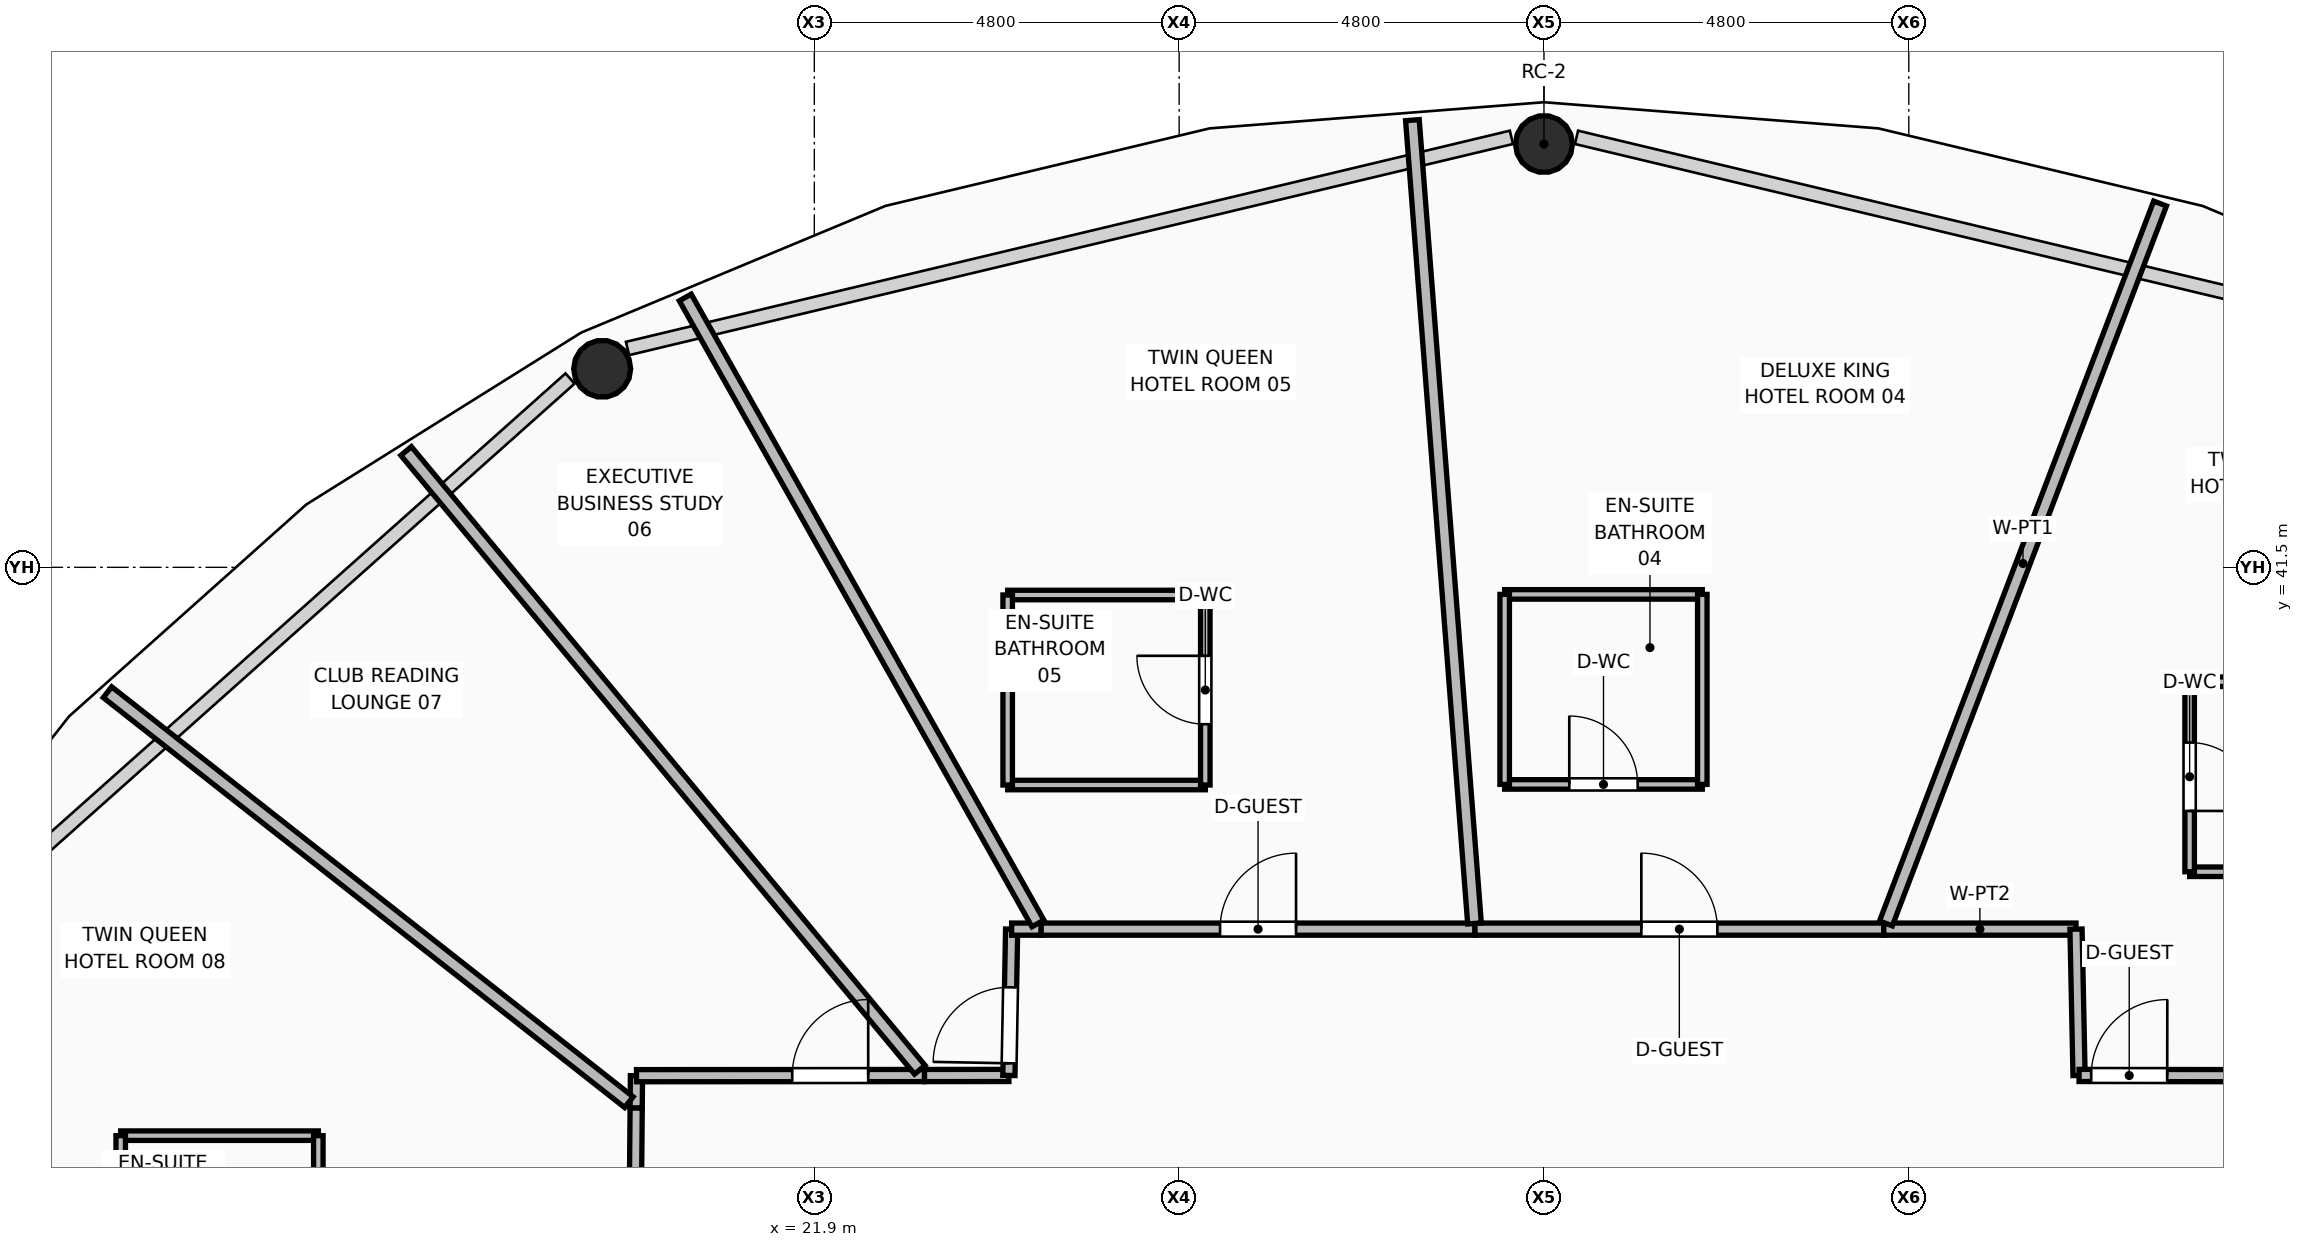
"""IFC4 building model, lengths in metres.
Left out: names, types, materials, properties, quantities, classifications, styles, units other than length and angle.
Written with IfcOpenShell. Run it as: python <this file> out.ifc"""

import sys

from ifc_helpers import new_model, si_unit, direction, frame, frame_2d, origin, origin_2d, place, context, subcontext, project, spatial, rectangle, hollow_circle, extrude, element, fill, save


model = new_model("IFC4")
c1 = context("Model", 3, precision=1e-05, world=origin(), true_north=direction((0.0, 1.0)))
c2 = subcontext(c1, "Body", "Model", "MODEL_VIEW")
j1 = project(units=[si_unit("LENGTHUNIT", "METRE"), si_unit("PLANEANGLEUNIT", "RADIAN")], contexts=[c1])
p1 = place(None, origin())
s1 = spatial("IfcSite", under=j1, at=p1, CompositionType="ELEMENT")
p2 = place(p1, origin())
s2 = spatial("IfcBuilding", under=s1, at=p2, CompositionType="ELEMENT")
p3 = place(p2, frame((0.0, 0.0, 153.45)))
s3 = spatial("IfcBuildingStorey", under=s2, at=p3, CompositionType="ELEMENT", Elevation=153.45)
for number, where, z_axis, x_axis in (
    (1, (31.5, 47.069, 0.0), (0.0, 0.0, 1.0), (1.0, 0.0, 0.0)),
    (2, (19.109, 44.112, 0.0), (0.0, 0.0, 1.0), (1.0, 0.0, 0.0)),
):
    element("IfcColumn", number, at=place(p3, frame(where, z_axis=z_axis, x_axis=x_axis)), inside=s3, PredefinedType="COLUMN", context=c2, shape_type="SweptSolid", body=[
        extrude(hollow_circle(Radius=0.375, WallThickness=0.035, at=origin_2d()), origin(), (0.0, 0.0, 1.0), 3.57),
    ])
p4 = place(p3, frame((19.535, 32.04, 0.0), z_axis=(0.0, 0.0, 1.0), x_axis=(0.008938422662, 0.999960051502, 0.0)))
e3 = element("IfcWall", 3, at=p4, inside=s3, PredefinedType="PARTITIONING", context=c2, shape_type="SweptSolid", body=[
    extrude(rectangle(XDim=2.349, YDim=0.16, at=frame_2d((1.174, 0.0))), origin(), (0.0, 0.0, 1.0), 3.006),
])
p5 = place(p3, frame((19.556, 34.389, 0.0), z_axis=(0.0, 0.0, 1.0), x_axis=(0.009809106822, 0.999951889554, 0.0)))
e4 = element("IfcWall", 4, at=p5, inside=s3, PredefinedType="PARTITIONING", context=c2, shape_type="SweptSolid", body=[
    extrude(rectangle(XDim=0.423, YDim=0.16, at=frame_2d((0.211, 0.0))), origin(), (0.0, 0.0, 1.0), 3.55),
])
p6 = place(p3, frame((19.56, 34.812, 0.0), z_axis=(0.0, 0.0, 1.0), x_axis=(0.999999867217, 0.000515331032, 0.0)))
e5 = element("IfcWall", 5, at=p6, inside=s3, PredefinedType="PARTITIONING", context=c2, shape_type="SweptSolid", body=[
    extrude(rectangle(XDim=3.79, YDim=0.16, at=frame_2d((1.895, 0.0))), origin(), (0.0, 0.0, 1.0), 3.006),
])
p7 = place(p6, frame((2.049, 0.0, 0.0)))
e6 = element("IfcOpeningElement", 6, at=p7, cuts=e5, PredefinedType="OPENING", context=c2, shape_type="SweptSolid", body=[
    extrude(rectangle(XDim=1.0, YDim=2.1, at=frame_2d((0.5, 1.05))), frame((0.0, 0.09, 0.0), z_axis=(0.0, -1.0, 0.0), x_axis=(1.0, 0.0, 0.0)), (0.0, 0.0, 1.0), 0.18),
])
p8 = place(p3, frame((23.35, 34.814, 0.0), z_axis=(0.0, 0.0, 1.0), x_axis=(0.999999612893, 0.000879894072, 0.0)))
e7 = element("IfcWall", 7, at=p8, inside=s3, PredefinedType="PARTITIONING", context=c2, shape_type="SweptSolid", body=[
    extrude(rectangle(XDim=1.11, YDim=0.16, at=frame_2d((0.555, 0.0))), origin(), (0.0, 0.0, 1.0), 3.55),
])
p9 = place(p3, frame((24.46, 34.815, 0.0), z_axis=(0.0, 0.0, 1.0), x_axis=(0.018766510621, 0.999823893533, 0.0)))
e8 = element("IfcWall", 8, at=p9, inside=s3, PredefinedType="PARTITIONING", context=c2, shape_type="SweptSolid", body=[
    extrude(rectangle(XDim=1.925, YDim=0.16, at=frame_2d((0.963, 0.0))), origin(), (0.0, 0.0, 1.0), 3.55),
])
p10 = place(p9, frame((0.16, 0.0, 0.0)))
e9 = element("IfcOpeningElement", 9, at=p10, cuts=e8, PredefinedType="OPENING", context=c2, shape_type="SweptSolid", body=[
    extrude(rectangle(XDim=1.0, YDim=2.1, at=frame_2d((0.5, 1.05))), frame((0.0, 0.09, 0.0), z_axis=(0.0, -1.0, 0.0), x_axis=(1.0, 0.0, 0.0)), (0.0, 0.0, 1.0), 0.18),
])
p11 = place(p3, frame((24.496, 36.74, 0.0), z_axis=(0.0, 0.0, 1.0), x_axis=(1.0, 0.0, 0.0)))
e10 = element("IfcWall", 10, at=p11, inside=s3, PredefinedType="PARTITIONING", context=c2, shape_type="SweptSolid", body=[
    extrude(rectangle(XDim=0.389, YDim=0.16, at=frame_2d((0.194, 0.0))), origin(), (0.0, 0.0, 1.0), 3.55),
])
p12 = place(p3, frame((24.885, 36.74, 0.0), z_axis=(0.0, 0.0, 1.0), x_axis=(1.0, 0.0, 0.0)))
e11 = element("IfcWall", 11, at=p12, inside=s3, PredefinedType="PARTITIONING", context=c2, shape_type="SweptSolid", body=[
    extrude(rectangle(XDim=5.707, YDim=0.16, at=frame_2d((2.854, 0.0))), origin(), (0.0, 0.0, 1.0), 3.55),
])
p13 = place(p12, frame((2.353, 0.0, 0.0)))
e12 = element("IfcOpeningElement", 12, at=p13, cuts=e11, PredefinedType="OPENING", context=c2, shape_type="SweptSolid", body=[
    extrude(rectangle(XDim=1.0, YDim=2.1, at=frame_2d((0.5, 1.05))), frame((0.0, 0.09, 0.0), z_axis=(0.0, -1.0, 0.0), x_axis=(1.0, 0.0, 0.0)), (0.0, 0.0, 1.0), 0.18),
])
p14 = place(p3, frame((30.592, 36.74, 0.0), z_axis=(0.0, 0.0, 1.0), x_axis=(1.0, 0.0, 0.0)))
e13 = element("IfcWall", 13, at=p14, inside=s3, PredefinedType="PARTITIONING", context=c2, shape_type="SweptSolid", body=[
    extrude(rectangle(XDim=5.379, YDim=0.16, at=frame_2d((2.689, 0.0))), origin(), (0.0, 0.0, 1.0), 3.006),
])
p15 = place(p14, frame((2.189, 0.0, 0.0)))
e14 = element("IfcOpeningElement", 14, at=p15, cuts=e13, PredefinedType="OPENING", context=c2, shape_type="SweptSolid", body=[
    extrude(rectangle(XDim=1.0, YDim=2.1, at=frame_2d((0.5, 1.05))), frame((0.0, 0.09, 0.0), z_axis=(0.0, -1.0, 0.0), x_axis=(1.0, 0.0, 0.0)), (0.0, 0.0, 1.0), 0.18),
])
p16 = place(p3, frame((35.971, 36.74, 0.0), z_axis=(0.0, 0.0, 1.0), x_axis=(1.0, 0.0, 0.0)))
e15 = element("IfcWall", 15, at=p16, inside=s3, PredefinedType="PARTITIONING", context=c2, shape_type="SweptSolid", body=[
    extrude(rectangle(XDim=2.529, YDim=0.16, at=frame_2d((1.265, 0.0))), origin(), (0.0, 0.0, 1.0), 3.55),
])
p17 = place(p3, frame((38.5, 36.74, 0.0), z_axis=(0.0, 0.0, 1.0), x_axis=(0.020794488077, -0.999783771255, 0.0)))
e16 = element("IfcWall", 16, at=p17, inside=s3, PredefinedType="PARTITIONING", context=c2, shape_type="SweptSolid", body=[
    extrude(rectangle(XDim=1.926, YDim=0.16, at=frame_2d((0.963, 0.0))), origin(), (0.0, 0.0, 1.0), 3.55),
])
p18 = place(p3, frame((38.54, 34.815, 0.0), z_axis=(0.0, 0.0, 1.0), x_axis=(0.999999250619, -0.001224239034, 0.0)))
e17 = element("IfcWall", 17, at=p18, inside=s3, PredefinedType="PARTITIONING", context=c2, shape_type="SweptSolid", body=[
    extrude(rectangle(XDim=2.393, YDim=0.16, at=frame_2d((1.197, 0.0))), origin(), (0.0, 0.0, 1.0), 3.55),
])
p19 = place(p18, frame((0.16, 0.0, 0.0)))
e18 = element("IfcOpeningElement", 18, at=p19, cuts=e17, PredefinedType="OPENING", context=c2, shape_type="SweptSolid", body=[
    extrude(rectangle(XDim=1.0, YDim=2.1, at=frame_2d((0.5, 1.05))), frame((0.0, 0.09, 0.0), z_axis=(0.0, -1.0, 0.0), x_axis=(1.0, 0.0, 0.0)), (0.0, 0.0, 1.0), 0.18),
])
p20 = place(p3, frame((35.999, 36.815, 0.0), z_axis=(0.0, 0.0, 1.0), x_axis=(0.355905167446, 0.934522076671, 0.0)))
e19 = element("IfcWall", 19, at=p20, inside=s3, PredefinedType="PARTITIONING", context=c2, shape_type="SweptSolid", body=[
    extrude(rectangle(XDim=10.135, YDim=0.18, at=frame_2d((5.067, 0.0))), origin(), (0.0, 0.0, 1.0), 2.852),
])
p21 = place(p3, frame((30.586, 36.815, 0.0), z_axis=(0.0, 0.0, 1.0), x_axis=(-0.077068136428, 0.997025828325, 0.0)))
e20 = element("IfcWall", 20, at=p21, inside=s3, PredefinedType="PARTITIONING", context=c2, shape_type="SweptSolid", body=[
    extrude(rectangle(XDim=10.6, YDim=0.18, at=frame_2d((5.3, 0.0))), origin(), (0.0, 0.0, 1.0), 2.852),
])
p22 = place(p3, frame((24.842, 36.815, 0.0), z_axis=(0.0, 0.0, 1.0), x_axis=(-0.490895094361, 0.871218690302, 0.0)))
e21 = element("IfcWall", 21, at=p22, inside=s3, PredefinedType="PARTITIONING", context=c2, shape_type="SweptSolid", body=[
    extrude(rectangle(XDim=9.452, YDim=0.18, at=frame_2d((4.726, 0.0))), origin(), (0.0, 0.0, 1.0), 2.852),
])
p23 = place(p3, frame((23.288, 34.89, 0.0), z_axis=(0.0, 0.0, 1.0), x_axis=(-0.638821611384, 0.76935489134, 0.0)))
e22 = element("IfcWall", 22, at=p23, inside=s3, PredefinedType="PARTITIONING", context=c2, shape_type="SweptSolid", body=[
    extrude(rectangle(XDim=10.581, YDim=0.18, at=frame_2d((5.29, 0.0))), origin(), (0.0, 0.0, 1.0), 2.852),
])
p24 = place(p3, frame((19.46, 34.464, 0.0), z_axis=(0.0, 0.0, 1.0), x_axis=(-0.786155203297, 0.618029122558, 0.0)))
e23 = element("IfcWall", 23, at=p24, inside=s3, PredefinedType="PARTITIONING", context=c2, shape_type="SweptSolid", body=[
    extrude(rectangle(XDim=8.726, YDim=0.18, at=frame_2d((4.363, 0.0))), origin(), (0.0, 0.0, 1.0), 2.852),
])
p25 = place(p3, frame((39.995, 37.495, 0.0), z_axis=(0.0, 0.0, 1.0), x_axis=(1.0, 0.0, 0.0)))
e24 = element("IfcWall", 24, at=p25, inside=s3, PredefinedType="PARTITIONING", context=c2, shape_type="SweptSolid", body=[
    extrude(rectangle(XDim=2.6, YDim=0.125, at=frame_2d((1.3, 0.0))), origin(), (0.0, 0.0, 1.0), 3.006),
])
p26 = place(p3, frame((39.995, 39.995, 0.0), z_axis=(0.0, 0.0, 1.0), x_axis=(1.0, 0.0, 0.0)))
e25 = element("IfcWall", 25, at=p26, inside=s3, PredefinedType="PARTITIONING", context=c2, shape_type="SweptSolid", body=[
    extrude(rectangle(XDim=2.6, YDim=0.125, at=frame_2d((1.3, 0.0))), origin(), (0.0, 0.0, 1.0), 3.55),
])
p27 = place(p3, frame((39.995, 37.495, 0.0), z_axis=(0.0, 0.0, 1.0), x_axis=(0.0, 1.0, 0.0)))
e26 = element("IfcWall", 26, at=p27, inside=s3, PredefinedType="PARTITIONING", context=c2, shape_type="SweptSolid", body=[
    extrude(rectangle(XDim=2.5, YDim=0.125, at=frame_2d((1.25, 0.0))), origin(), (0.0, 0.0, 1.0), 3.55),
])
p28 = place(p27, frame((0.8, 0.0, 0.0)))
e27 = element("IfcOpeningElement", 27, at=p28, cuts=e26, PredefinedType="OPENING", context=c2, shape_type="SweptSolid", body=[
    extrude(rectangle(XDim=0.9, YDim=2.1, at=frame_2d((0.45, 1.05))), frame((0.0, 0.073, 0.0), z_axis=(0.0, -1.0, 0.0), x_axis=(1.0, 0.0, 0.0)), (0.0, 0.0, 1.0), 0.145),
])
p29 = place(p3, frame((30.983, 38.644, 0.0), z_axis=(0.0, 0.0, 1.0), x_axis=(1.0, 0.0, 0.0)))
e28 = element("IfcWall", 28, at=p29, inside=s3, PredefinedType="PARTITIONING", context=c2, shape_type="SweptSolid", body=[
    extrude(rectangle(XDim=2.6, YDim=0.125, at=frame_2d((1.3, 0.0))), origin(), (0.0, 0.0, 1.0), 3.006),
])
p30 = place(p29, frame((0.85, 0.0, 0.0)))
e29 = element("IfcOpeningElement", 29, at=p30, cuts=e28, PredefinedType="OPENING", context=c2, shape_type="SweptSolid", body=[
    extrude(rectangle(XDim=0.9, YDim=2.1, at=frame_2d((0.45, 1.05))), frame((0.0, 0.073, 0.0), z_axis=(0.0, -1.0, 0.0), x_axis=(1.0, 0.0, 0.0)), (0.0, 0.0, 1.0), 0.145),
])
p31 = place(p3, frame((30.983, 41.144, 0.0), z_axis=(0.0, 0.0, 1.0), x_axis=(1.0, 0.0, 0.0)))
e30 = element("IfcWall", 30, at=p31, inside=s3, PredefinedType="PARTITIONING", context=c2, shape_type="SweptSolid", body=[
    extrude(rectangle(XDim=2.6, YDim=0.125, at=frame_2d((1.3, 0.0))), origin(), (0.0, 0.0, 1.0), 3.006),
])
for number, where, z_axis, x_axis in (
    (31, (30.983, 38.644, 0.0), (0.0, 0.0, 1.0), (0.0, 1.0, 0.0)),
    (32, (33.583, 38.644, 0.0), (0.0, 0.0, 1.0), (0.0, 1.0, 0.0)),
):
    element("IfcWall", number, at=place(p3, frame(where, z_axis=z_axis, x_axis=x_axis)), inside=s3, PredefinedType="PARTITIONING", context=c2, shape_type="SweptSolid", body=[
        extrude(rectangle(XDim=2.5, YDim=0.125, at=frame_2d((1.25, 0.0))), origin(), (0.0, 0.0, 1.0), 3.55),
    ])
for number, where, z_axis, x_axis in (
    (33, (24.444, 38.636, 0.0), (0.0, 0.0, 1.0), (1.0, 0.0, 0.0)),
    (34, (24.444, 41.136, 0.0), (0.0, 0.0, 1.0), (1.0, 0.0, 0.0)),
):
    element("IfcWall", number, at=place(p3, frame(where, z_axis=z_axis, x_axis=x_axis)), inside=s3, PredefinedType="PARTITIONING", context=c2, shape_type="SweptSolid", body=[
        extrude(rectangle(XDim=2.6, YDim=0.125, at=frame_2d((1.3, 0.0))), origin(), (0.0, 0.0, 1.0), 3.55),
    ])
p32 = place(p3, frame((24.444, 38.636, 0.0), z_axis=(0.0, 0.0, 1.0), x_axis=(0.0, 1.0, 0.0)))
e35 = element("IfcWall", 35, at=p32, inside=s3, PredefinedType="PARTITIONING", context=c2, shape_type="SweptSolid", body=[
    extrude(rectangle(XDim=2.5, YDim=0.125, at=frame_2d((1.25, 0.0))), origin(), (0.0, 0.0, 1.0), 3.55),
])
p33 = place(p3, frame((27.044, 38.636, 0.0), z_axis=(0.0, 0.0, 1.0), x_axis=(0.0, 1.0, 0.0)))
e36 = element("IfcWall", 36, at=p33, inside=s3, PredefinedType="PARTITIONING", context=c2, shape_type="SweptSolid", body=[
    extrude(rectangle(XDim=2.5, YDim=0.125, at=frame_2d((1.25, 0.0))), origin(), (0.0, 0.0, 1.0), 3.55),
])
p34 = place(p33, frame((0.8, 0.0, 0.0)))
e37 = element("IfcOpeningElement", 37, at=p34, cuts=e36, PredefinedType="OPENING", context=c2, shape_type="SweptSolid", body=[
    extrude(rectangle(XDim=0.9, YDim=2.1, at=frame_2d((0.45, 1.05))), frame((0.0, 0.073, 0.0), z_axis=(0.0, -1.0, 0.0), x_axis=(1.0, 0.0, 0.0)), (0.0, 0.0, 1.0), 0.145),
])
p35 = place(p3, frame((12.774, 34.023, 0.0), z_axis=(0.0, 0.0, 1.0), x_axis=(1.0, 0.0, 0.0)))
e38 = element("IfcWall", 38, at=p35, inside=s3, PredefinedType="PARTITIONING", context=c2, shape_type="SweptSolid", body=[
    extrude(rectangle(XDim=2.6, YDim=0.125, at=frame_2d((1.3, 0.0))), origin(), (0.0, 0.0, 1.0), 3.55),
])
p36 = place(p3, frame((12.774, 31.523, 0.0), z_axis=(0.0, 0.0, 1.0), x_axis=(0.0, 1.0, 0.0)))
e39 = element("IfcWall", 39, at=p36, inside=s3, PredefinedType="PARTITIONING", context=c2, shape_type="SweptSolid", body=[
    extrude(rectangle(XDim=2.5, YDim=0.125, at=frame_2d((1.25, 0.0))), origin(), (0.0, 0.0, 1.0), 3.55),
])
p37 = place(p3, frame((15.374, 31.523, 0.0), z_axis=(0.0, 0.0, 1.0), x_axis=(0.0, 1.0, 0.0)))
e40 = element("IfcWall", 40, at=p37, inside=s3, PredefinedType="PARTITIONING", context=c2, shape_type="SweptSolid", body=[
    extrude(rectangle(XDim=2.5, YDim=0.125, at=frame_2d((1.25, 0.0))), origin(), (0.0, 0.0, 1.0), 3.55),
])
p38 = place(p37, frame((0.8, 0.0, 0.0)))
e41 = element("IfcOpeningElement", 41, at=p38, cuts=e40, PredefinedType="OPENING", context=c2, shape_type="SweptSolid", body=[
    extrude(rectangle(XDim=0.9, YDim=2.1, at=frame_2d((0.45, 1.05))), frame((0.0, 0.073, 0.0), z_axis=(0.0, -1.0, 0.0), x_axis=(1.0, 0.0, 0.0)), (0.0, 0.0, 1.0), 0.145),
])
p39 = place(p28, frame((0.9, 0.0, 0.0), z_axis=(0.0, 0.0, 1.0), x_axis=(-1.0, 0.0, 0.0)))
e42 = element("IfcDoor", 42, at=p39, inside=s3, OperationType="SINGLE_SWING_RIGHT", PredefinedType="DOOR", context=c2, shape_type="SweptSolid", body=[
    extrude(rectangle(XDim=0.9, YDim=2.1, at=frame_2d((0.45, 1.05))), frame((0.0, 0.025, 0.0), z_axis=(0.0, -1.0, 0.0), x_axis=(1.0, 0.0, 0.0)), (0.0, 0.0, 1.0), 0.05),
])
fill(e27, e42)
p40 = place(p19, origin())
e43 = element("IfcDoor", 43, at=p40, inside=s3, OperationType="SINGLE_SWING_RIGHT", PredefinedType="DOOR", context=c2, shape_type="SweptSolid", body=[
    extrude(rectangle(XDim=1.0, YDim=2.1, at=frame_2d((0.5, 1.05))), frame((0.0, 0.025, 0.0), z_axis=(0.0, -1.0, 0.0), x_axis=(1.0, 0.0, 0.0)), (0.0, 0.0, 1.0), 0.05),
])
fill(e18, e43)
p41 = place(p30, origin())
e44 = element("IfcDoor", 44, at=p41, inside=s3, OperationType="SINGLE_SWING_LEFT", PredefinedType="DOOR", context=c2, shape_type="SweptSolid", body=[
    extrude(rectangle(XDim=0.9, YDim=2.1, at=frame_2d((0.45, 1.05))), frame((0.0, 0.025, 0.0), z_axis=(0.0, -1.0, 0.0), x_axis=(1.0, 0.0, 0.0)), (0.0, 0.0, 1.0), 0.05),
])
fill(e29, e44)
p42 = place(p15, origin())
e45 = element("IfcDoor", 45, at=p42, inside=s3, OperationType="SINGLE_SWING_LEFT", PredefinedType="DOOR", context=c2, shape_type="SweptSolid", body=[
    extrude(rectangle(XDim=1.0, YDim=2.1, at=frame_2d((0.5, 1.05))), frame((0.0, 0.025, 0.0), z_axis=(0.0, -1.0, 0.0), x_axis=(1.0, 0.0, 0.0)), (0.0, 0.0, 1.0), 0.05),
])
fill(e14, e45)
p43 = place(p34, origin())
e46 = element("IfcDoor", 46, at=p43, inside=s3, OperationType="SINGLE_SWING_RIGHT", PredefinedType="DOOR", context=c2, shape_type="SweptSolid", body=[
    extrude(rectangle(XDim=0.9, YDim=2.1, at=frame_2d((0.45, 1.05))), frame((0.0, 0.025, 0.0), z_axis=(0.0, -1.0, 0.0), x_axis=(1.0, 0.0, 0.0)), (0.0, 0.0, 1.0), 0.05),
])
fill(e37, e46)
p44 = place(p13, origin())
e47 = element("IfcDoor", 47, at=p44, inside=s3, OperationType="SINGLE_SWING_RIGHT", PredefinedType="DOOR", context=c2, shape_type="SweptSolid", body=[
    extrude(rectangle(XDim=1.0, YDim=2.1, at=frame_2d((0.5, 1.05))), frame((0.0, 0.025, 0.0), z_axis=(0.0, -1.0, 0.0), x_axis=(1.0, 0.0, 0.0)), (0.0, 0.0, 1.0), 0.05),
])
fill(e12, e47)
p45 = place(p10, origin())
e48 = element("IfcDoor", 48, at=p45, inside=s3, OperationType="SINGLE_SWING_LEFT", PredefinedType="DOOR", context=c2, shape_type="SweptSolid", body=[
    extrude(rectangle(XDim=1.0, YDim=2.1, at=frame_2d((0.5, 1.05))), frame((0.0, 0.025, 0.0), z_axis=(0.0, -1.0, 0.0), x_axis=(1.0, 0.0, 0.0)), (0.0, 0.0, 1.0), 0.05),
])
fill(e9, e48)
p46 = place(p7, origin())
e49 = element("IfcDoor", 49, at=p46, inside=s3, OperationType="SINGLE_SWING_RIGHT", PredefinedType="DOOR", context=c2, shape_type="SweptSolid", body=[
    extrude(rectangle(XDim=1.0, YDim=2.1, at=frame_2d((0.5, 1.05))), frame((0.0, 0.025, 0.0), z_axis=(0.0, -1.0, 0.0), x_axis=(1.0, 0.0, 0.0)), (0.0, 0.0, 1.0), 0.05),
])
fill(e6, e49)
save(model, sys.argv[1])
